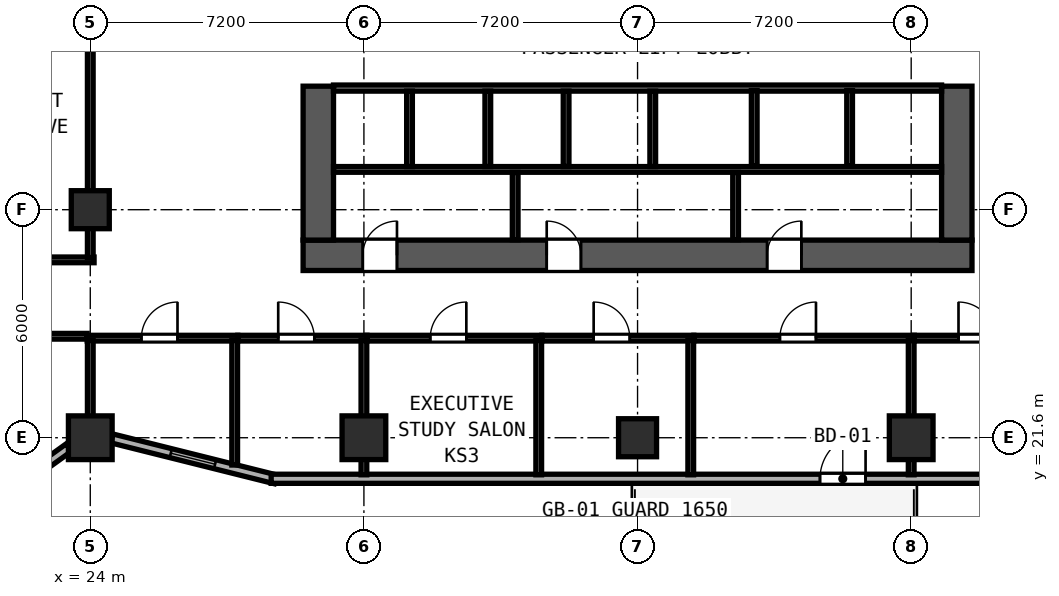
"""IFC4 building model, lengths in metres.
Left out: names, types, materials, properties, quantities, classifications, styles, units other than length and angle.
Written with IfcOpenShell. Run it as: python <this file> out.ifc"""

import sys

from ifc_helpers import new_model, si_unit, direction, frame, frame_2d, origin, origin_2d, place, context, subcontext, project, spatial, rectangle, hollow_rectangle, extrude, element, fill, save


model = new_model("IFC4")
c1 = context("Model", 3, precision=1e-05, world=origin(), true_north=direction((0.0, 1.0)))
c2 = subcontext(c1, "Body", "Model", "MODEL_VIEW")
j1 = project(units=[si_unit("LENGTHUNIT", "METRE"), si_unit("PLANEANGLEUNIT", "RADIAN")], contexts=[c1])
p1 = place(None, origin())
s1 = spatial("IfcSite", under=j1, at=p1, CompositionType="ELEMENT")
p2 = place(p1, origin())
s2 = spatial("IfcBuilding", under=s1, at=p2, CompositionType="ELEMENT")
p3 = place(p2, frame((0.0, 0.0, 47.6)))
s3 = spatial("IfcBuildingStorey", under=s2, at=p3, CompositionType="ELEMENT", Elevation=47.6)
p4 = place(p3, frame((29.6, 26.4, 0.0), z_axis=(0.0, 0.0, 1.0), x_axis=(1.0, 0.0, 0.0)))
e1 = element("IfcWall", 1, at=p4, inside=s3, PredefinedType="SHEAR", context=c2, shape_type="SweptSolid", body=[
    extrude(rectangle(XDim=17.6, YDim=0.8, at=frame_2d((8.8, 0.0))), origin(), (0.0, 0.0, 1.0), 3.6),
])
p5 = place(p4, frame((2.47, 0.0, 0.0), z_axis=(0.0, 0.0, 1.0), x_axis=(-1.0, 0.0, 0.0)))
e2 = element("IfcOpeningElement", 2, at=p5, cuts=e1, PredefinedType="OPENING", context=c2, shape_type="SweptSolid", body=[
    extrude(rectangle(XDim=0.9, YDim=2.1, at=frame_2d((0.45, 1.05))), frame((0.0, 0.41, 0.0), z_axis=(0.0, -1.0, 0.0), x_axis=(1.0, 0.0, 0.0)), (0.0, 0.0, 1.0), 0.82),
])
p6 = place(p4, frame((7.31, 0.0, 0.0), z_axis=(0.0, 0.0, 1.0), x_axis=(-1.0, 0.0, 0.0)))
e3 = element("IfcOpeningElement", 3, at=p6, cuts=e1, PredefinedType="OPENING", context=c2, shape_type="SweptSolid", body=[
    extrude(rectangle(XDim=0.9, YDim=2.1, at=frame_2d((0.45, 1.05))), frame((0.0, 0.41, 0.0), z_axis=(0.0, -1.0, 0.0), x_axis=(1.0, 0.0, 0.0)), (0.0, 0.0, 1.0), 0.82),
])
p7 = place(p4, frame((13.11, 0.0, 0.0), z_axis=(0.0, 0.0, 1.0), x_axis=(-1.0, 0.0, 0.0)))
e4 = element("IfcOpeningElement", 4, at=p7, cuts=e1, PredefinedType="OPENING", context=c2, shape_type="SweptSolid", body=[
    extrude(rectangle(XDim=0.9, YDim=2.1, at=frame_2d((0.45, 1.05))), frame((0.0, 0.41, 0.0), z_axis=(0.0, -1.0, 0.0), x_axis=(1.0, 0.0, 0.0)), (0.0, 0.0, 1.0), 0.82),
])
for number, where, z_axis, x_axis in (
    (5, (30.0, 26.8, 0.0), (0.0, 0.0, 1.0), (0.0, 1.0, 0.0)),
    (6, (46.8, 26.8, 0.0), (0.0, 0.0, 1.0), (0.0, 1.0, 0.0)),
):
    element("IfcWall", number, at=place(p3, frame(where, z_axis=z_axis, x_axis=x_axis)), inside=s3, PredefinedType="SHEAR", context=c2, shape_type="SweptSolid", body=[
        extrude(rectangle(XDim=4.05, YDim=0.8, at=frame_2d((2.025, 0.0))), origin(), (0.0, 0.0, 1.0), 3.6),
    ])
for number, where, z_axis, x_axis in (
    (7, (24.0, 21.6, 0.0), (0.0, 0.0, 1.0), (1.0, 0.0, 0.0)),
    (8, (31.2, 21.6, 0.0), (0.0, 0.0, 1.0), (1.0, 0.0, 0.0)),
    (9, (45.6, 21.6, 0.0), (0.0, 0.0, 1.0), (1.0, 0.0, 0.0)),
):
    element("IfcColumn", number, at=place(p3, frame(where, z_axis=z_axis, x_axis=x_axis)), inside=s3, PredefinedType="COLUMN", context=c2, shape_type="SweptSolid", body=[
        extrude(hollow_rectangle(XDim=1.15, YDim=1.15, WallThickness=0.042, at=origin_2d()), origin(), (0.0, 0.0, 1.0), 3.8),
    ])
for number, where, z_axis, x_axis in (
    (10, (24.0, 27.6, 0.0), (0.0, 0.0, 1.0), (1.0, 0.0, 0.0)),
    (11, (38.4, 21.6, 0.0), (0.0, 0.0, 1.0), (1.0, 0.0, 0.0)),
):
    element("IfcColumn", number, at=place(p3, frame(where, z_axis=z_axis, x_axis=x_axis)), inside=s3, PredefinedType="COLUMN", context=c2, shape_type="SweptSolid", body=[
        extrude(hollow_rectangle(XDim=1.0, YDim=1.0, WallThickness=0.038, at=origin_2d()), origin(), (0.0, 0.0, 1.0), 3.8),
    ])
p8 = place(p3, frame((14.075, 14.602, 0.0), z_axis=(0.0, 0.0, 1.0), x_axis=(0.811543176492, 0.58429245476, 0.0)))
e12 = element("IfcWall", 12, at=p8, inside=s3, PredefinedType="SOLIDWALL", context=c2, shape_type="SweptSolid", body=[
    extrude(rectangle(XDim=11.531, YDim=0.24, at=frame_2d((5.765, 0.0))), origin(), (0.0, 0.0, 1.0), 3.097),
])
p9 = place(p8, frame((0.95, 0.0, 0.85)))
e13 = element("IfcOpeningElement", 13, at=p9, cuts=e12, PredefinedType="OPENING", context=c2, shape_type="SweptSolid", body=[
    extrude(rectangle(XDim=1.2, YDim=1.85, at=frame_2d((0.6, 0.925))), frame((0.0, 0.13, 0.0), z_axis=(0.0, -1.0, 0.0), x_axis=(1.0, 0.0, 0.0)), (0.0, 0.0, 1.0), 0.26),
])
p10 = place(p8, frame((7.574, 0.0, 0.85)))
e14 = element("IfcOpeningElement", 14, at=p10, cuts=e12, PredefinedType="OPENING", context=c2, shape_type="SweptSolid", body=[
    extrude(rectangle(XDim=1.2, YDim=1.85, at=frame_2d((0.6, 0.925))), frame((0.0, 0.13, 0.0), z_axis=(0.0, -1.0, 0.0), x_axis=(1.0, 0.0, 0.0)), (0.0, 0.0, 1.0), 0.26),
])
p11 = place(p8, frame((4.262, 0.0, 0.85)))
e15 = element("IfcOpeningElement", 15, at=p11, cuts=e12, PredefinedType="OPENING", context=c2, shape_type="SweptSolid", body=[
    extrude(rectangle(XDim=1.2, YDim=1.85, at=frame_2d((0.6, 0.925))), frame((0.0, 0.13, 0.0), z_axis=(0.0, -1.0, 0.0), x_axis=(1.0, 0.0, 0.0)), (0.0, 0.0, 1.0), 0.26),
])
p12 = place(p3, frame((24.567, 21.582, 0.0), z_axis=(0.0, 0.0, 1.0), x_axis=(0.970148978127, -0.24250971164, 0.0)))
e16 = element("IfcWall", 16, at=p12, inside=s3, PredefinedType="SOLIDWALL", context=c2, shape_type="SweptSolid", body=[
    extrude(rectangle(XDim=4.434, YDim=0.24, at=frame_2d((2.217, 0.0))), origin(), (0.0, 0.0, 1.0), 3.097),
])
p13 = place(p12, frame((1.6, 0.0, 0.85)))
e17 = element("IfcOpeningElement", 17, at=p13, cuts=e16, PredefinedType="OPENING", context=c2, shape_type="SweptSolid", body=[
    extrude(rectangle(XDim=1.2, YDim=1.85, at=frame_2d((0.6, 0.925))), frame((0.0, 0.13, 0.0), z_axis=(0.0, -1.0, 0.0), x_axis=(1.0, 0.0, 0.0)), (0.0, 0.0, 1.0), 0.26),
])
p14 = place(p3, frame((28.76, 20.52, 0.0), z_axis=(0.0, 0.0, 1.0), x_axis=(1.0, 0.0, 0.0)))
e18 = element("IfcWall", 18, at=p14, inside=s3, PredefinedType="SOLIDWALL", context=c2, shape_type="SweptSolid", body=[
    extrude(rectangle(XDim=19.281, YDim=0.24, at=frame_2d((9.64, 0.0))), origin(), (0.0, 0.0, 1.0), 3.6),
])
p15 = place(p14, frame((15.64, 0.0, 0.0), z_axis=(0.0, 0.0, 1.0), x_axis=(-1.0, 0.0, 0.0)))
e19 = element("IfcOpeningElement", 19, at=p15, cuts=e18, PredefinedType="OPENING", context=c2, shape_type="SweptSolid", body=[
    extrude(rectangle(XDim=1.2, YDim=2.15, at=frame_2d((0.6, 1.075))), frame((0.0, 0.13, 0.0), z_axis=(0.0, -1.0, 0.0), x_axis=(1.0, 0.0, 0.0)), (0.0, 0.0, 1.0), 0.26),
])
p16 = place(p3, frame((30.4, 30.8, 0.0), z_axis=(0.0, 0.0, 1.0), x_axis=(1.0, 0.0, 0.0)))
e20 = element("IfcWall", 20, at=p16, inside=s3, PredefinedType="SOLIDWALL", context=c2, shape_type="SweptSolid", body=[
    extrude(rectangle(XDim=16.0, YDim=0.16, at=frame_2d((8.0, 0.0))), origin(), (0.0, 0.0, 1.0), 3.6),
])
p17 = place(p3, frame((30.4, 28.66, 0.0), z_axis=(0.0, 0.0, 1.0), x_axis=(1.0, 0.0, 0.0)))
e21 = element("IfcWall", 21, at=p17, inside=s3, PredefinedType="PARTITIONING", context=c2, shape_type="SweptSolid", body=[
    extrude(rectangle(XDim=16.0, YDim=0.15, at=frame_2d((8.0, 0.0))), origin(), (0.0, 0.0, 1.0), 3.6),
])
for number, where, z_axis, x_axis in (
    (22, (32.4, 28.735, 0.0), (0.0, 0.0, 1.0), (0.0, 1.0, 0.0)),
    (23, (34.46, 28.735, 0.0), (0.0, 0.0, 1.0), (0.0, 1.0, 0.0)),
    (24, (36.52, 28.735, 0.0), (0.0, 0.0, 1.0), (0.0, 1.0, 0.0)),
    (25, (38.8, 28.735, 0.0), (0.0, 0.0, 1.0), (0.0, 1.0, 0.0)),
):
    element("IfcWall", number, at=place(p3, frame(where, z_axis=z_axis, x_axis=x_axis)), inside=s3, PredefinedType="SOLIDWALL", context=c2, shape_type="SweptSolid", body=[
        extrude(rectangle(XDim=1.985, YDim=0.15, at=frame_2d((0.992, 0.0))), origin(), (0.0, 0.0, 1.0), 3.6),
    ])
for number, where, z_axis, x_axis in (
    (26, (35.18, 26.81, 0.0), (0.0, 0.0, 1.0), (0.0, 1.0, 0.0)),
    (27, (40.98, 26.81, 0.0), (0.0, 0.0, 1.0), (0.0, 1.0, 0.0)),
):
    element("IfcWall", number, at=place(p3, frame(where, z_axis=z_axis, x_axis=x_axis)), inside=s3, PredefinedType="PARTITIONING", context=c2, shape_type="SweptSolid", body=[
        extrude(rectangle(XDim=1.77, YDim=0.15, at=frame_2d((0.885, 0.0))), origin(), (0.0, 0.0, 1.0), 3.6),
    ])
for number, where, z_axis, x_axis in (
    (28, (41.47, 28.75, 0.0), (0.0, 0.0, 1.0), (0.0, 1.0, 0.0)),
    (29, (43.98, 28.75, 0.0), (0.0, 0.0, 1.0), (0.0, 1.0, 0.0)),
):
    element("IfcWall", number, at=place(p3, frame(where, z_axis=z_axis, x_axis=x_axis)), inside=s3, PredefinedType="SOLIDWALL", context=c2, shape_type="SweptSolid", body=[
        extrude(rectangle(XDim=1.985, YDim=0.15, at=frame_2d((0.993, 0.0))), origin(), (0.0, 0.0, 1.0), 3.6),
    ])
p18 = place(p3, frame((23.92, 24.22, 0.0), z_axis=(0.0, 0.0, 1.0), x_axis=(1.0, 0.0, 0.0)))
e30 = element("IfcWall", 30, at=p18, inside=s3, PredefinedType="PARTITIONING", context=c2, shape_type="SweptSolid", body=[
    extrude(rectangle(XDim=3.96, YDim=0.15, at=frame_2d((1.98, 0.0))), origin(), (0.0, 0.0, 1.0), 3.6),
])
p19 = place(p18, frame((2.375, 0.0, 0.0), z_axis=(0.0, 0.0, 1.0), x_axis=(-1.0, 0.0, 0.0)))
e31 = element("IfcOpeningElement", 31, at=p19, cuts=e30, PredefinedType="OPENING", context=c2, shape_type="SweptSolid", body=[
    extrude(rectangle(XDim=0.95, YDim=2.12, at=frame_2d((0.475, 1.06))), frame((0.0, 0.085, 0.0), z_axis=(0.0, -1.0, 0.0), x_axis=(1.0, 0.0, 0.0)), (0.0, 0.0, 1.0), 0.17),
])
p20 = place(p3, frame((24.0, 21.819, 0.0), z_axis=(0.0, 0.0, 1.0), x_axis=(0.0, 1.0, 0.0)))
e32 = element("IfcWall", 32, at=p20, inside=s3, PredefinedType="PARTITIONING", context=c2, shape_type="SweptSolid", body=[
    extrude(rectangle(XDim=2.341, YDim=0.15, at=frame_2d((1.171, 0.0))), origin(), (0.0, 0.0, 1.0), 3.097),
])
p21 = place(p3, frame((27.8, 20.882, 0.0), z_axis=(0.0, 0.0, 1.0), x_axis=(0.0, 1.0, 0.0)))
e33 = element("IfcWall", 33, at=p21, inside=s3, PredefinedType="PARTITIONING", context=c2, shape_type="SweptSolid", body=[
    extrude(rectangle(XDim=3.278, YDim=0.15, at=frame_2d((1.639, 0.0))), origin(), (0.0, 0.0, 1.0), 3.6),
])
p22 = place(p3, frame((27.882, 24.22, 0.0), z_axis=(0.0, 0.0, 1.0), x_axis=(1.0, 0.0, 0.0)))
e34 = element("IfcWall", 34, at=p22, inside=s3, PredefinedType="PARTITIONING", context=c2, shape_type="SweptSolid", body=[
    extrude(rectangle(XDim=3.398, YDim=0.15, at=frame_2d((1.699, 0.0))), origin(), (0.0, 0.0, 1.0), 3.6),
])
p23 = place(p22, frame((2.013, 0.0, 0.0), z_axis=(0.0, 0.0, 1.0), x_axis=(-1.0, 0.0, 0.0)))
e35 = element("IfcOpeningElement", 35, at=p23, cuts=e34, PredefinedType="OPENING", context=c2, shape_type="SweptSolid", body=[
    extrude(rectangle(XDim=0.95, YDim=2.12, at=frame_2d((0.475, 1.06))), frame((0.0, 0.085, 0.0), z_axis=(0.0, -1.0, 0.0), x_axis=(1.0, 0.0, 0.0)), (0.0, 0.0, 1.0), 0.17),
])
p24 = place(p3, frame((31.2, 20.625, 0.0), z_axis=(0.0, 0.0, 1.0), x_axis=(0.0, 1.0, 0.0)))
e36 = element("IfcWall", 36, at=p24, inside=s3, PredefinedType="PARTITIONING", context=c2, shape_type="SweptSolid", body=[
    extrude(rectangle(XDim=3.535, YDim=0.15, at=frame_2d((1.768, 0.0))), origin(), (0.0, 0.0, 1.0), 2.985),
])
p25 = place(p3, frame((31.282, 24.22, 0.0), z_axis=(0.0, 0.0, 1.0), x_axis=(1.0, 0.0, 0.0)))
e37 = element("IfcWall", 37, at=p25, inside=s3, PredefinedType="PARTITIONING", context=c2, shape_type="SweptSolid", body=[
    extrude(rectangle(XDim=4.598, YDim=0.15, at=frame_2d((2.299, 0.0))), origin(), (0.0, 0.0, 1.0), 3.6),
])
p26 = place(p25, frame((2.613, 0.0, 0.0), z_axis=(0.0, 0.0, 1.0), x_axis=(-1.0, 0.0, 0.0)))
e38 = element("IfcOpeningElement", 38, at=p26, cuts=e37, PredefinedType="OPENING", context=c2, shape_type="SweptSolid", body=[
    extrude(rectangle(XDim=0.95, YDim=2.12, at=frame_2d((0.475, 1.06))), frame((0.0, 0.085, 0.0), z_axis=(0.0, -1.0, 0.0), x_axis=(1.0, 0.0, 0.0)), (0.0, 0.0, 1.0), 0.17),
])
p27 = place(p3, frame((35.8, 20.625, 0.0), z_axis=(0.0, 0.0, 1.0), x_axis=(0.0, 1.0, 0.0)))
e39 = element("IfcWall", 39, at=p27, inside=s3, PredefinedType="PARTITIONING", context=c2, shape_type="SweptSolid", body=[
    extrude(rectangle(XDim=3.535, YDim=0.15, at=frame_2d((1.768, 0.0))), origin(), (0.0, 0.0, 1.0), 3.6),
])
p28 = place(p3, frame((35.882, 24.22, 0.0), z_axis=(0.0, 0.0, 1.0), x_axis=(1.0, 0.0, 0.0)))
e40 = element("IfcWall", 40, at=p28, inside=s3, PredefinedType="PARTITIONING", context=c2, shape_type="SweptSolid", body=[
    extrude(rectangle(XDim=3.998, YDim=0.15, at=frame_2d((1.999, 0.0))), origin(), (0.0, 0.0, 1.0), 3.6),
])
p29 = place(p28, frame((2.313, 0.0, 0.0), z_axis=(0.0, 0.0, 1.0), x_axis=(-1.0, 0.0, 0.0)))
e41 = element("IfcOpeningElement", 41, at=p29, cuts=e40, PredefinedType="OPENING", context=c2, shape_type="SweptSolid", body=[
    extrude(rectangle(XDim=0.95, YDim=2.12, at=frame_2d((0.475, 1.06))), frame((0.0, 0.085, 0.0), z_axis=(0.0, -1.0, 0.0), x_axis=(1.0, 0.0, 0.0)), (0.0, 0.0, 1.0), 0.17),
])
p30 = place(p3, frame((39.8, 20.625, 0.0), z_axis=(0.0, 0.0, 1.0), x_axis=(0.0, 1.0, 0.0)))
e42 = element("IfcWall", 42, at=p30, inside=s3, PredefinedType="PARTITIONING", context=c2, shape_type="SweptSolid", body=[
    extrude(rectangle(XDim=3.535, YDim=0.15, at=frame_2d((1.768, 0.0))), origin(), (0.0, 0.0, 1.0), 3.6),
])
p31 = place(p3, frame((39.882, 24.22, 0.0), z_axis=(0.0, 0.0, 1.0), x_axis=(1.0, 0.0, 0.0)))
e43 = element("IfcWall", 43, at=p31, inside=s3, PredefinedType="PARTITIONING", context=c2, shape_type="SweptSolid", body=[
    extrude(rectangle(XDim=5.798, YDim=0.15, at=frame_2d((2.899, 0.0))), origin(), (0.0, 0.0, 1.0), 3.6),
])
p32 = place(p31, frame((3.213, 0.0, 0.0), z_axis=(0.0, 0.0, 1.0), x_axis=(-1.0, 0.0, 0.0)))
e44 = element("IfcOpeningElement", 44, at=p32, cuts=e43, PredefinedType="OPENING", context=c2, shape_type="SweptSolid", body=[
    extrude(rectangle(XDim=0.95, YDim=2.12, at=frame_2d((0.475, 1.06))), frame((0.0, 0.085, 0.0), z_axis=(0.0, -1.0, 0.0), x_axis=(1.0, 0.0, 0.0)), (0.0, 0.0, 1.0), 0.17),
])
p33 = place(p3, frame((45.6, 20.625, 0.0), z_axis=(0.0, 0.0, 1.0), x_axis=(0.0, 1.0, 0.0)))
e45 = element("IfcWall", 45, at=p33, inside=s3, PredefinedType="PARTITIONING", context=c2, shape_type="SweptSolid", body=[
    extrude(rectangle(XDim=3.535, YDim=0.15, at=frame_2d((1.768, 0.0))), origin(), (0.0, 0.0, 1.0), 2.985),
])
p34 = place(p3, frame((45.682, 24.22, 0.0), z_axis=(0.0, 0.0, 1.0), x_axis=(1.0, 0.0, 0.0)))
e46 = element("IfcWall", 46, at=p34, inside=s3, PredefinedType="PARTITIONING", context=c2, shape_type="SweptSolid", body=[
    extrude(rectangle(XDim=3.598, YDim=0.15, at=frame_2d((1.799, 0.0))), origin(), (0.0, 0.0, 1.0), 3.6),
])
p35 = place(p34, frame((2.113, 0.0, 0.0), z_axis=(0.0, 0.0, 1.0), x_axis=(-1.0, 0.0, 0.0)))
e47 = element("IfcOpeningElement", 47, at=p35, cuts=e46, PredefinedType="OPENING", context=c2, shape_type="SweptSolid", body=[
    extrude(rectangle(XDim=0.95, YDim=2.12, at=frame_2d((0.475, 1.06))), frame((0.0, 0.085, 0.0), z_axis=(0.0, -1.0, 0.0), x_axis=(1.0, 0.0, 0.0)), (0.0, 0.0, 1.0), 0.17),
])
p36 = place(p3, frame((20.072, 26.28, 0.0), z_axis=(0.0, 0.0, 1.0), x_axis=(1.0, 0.0, 0.0)))
e48 = element("IfcWall", 48, at=p36, inside=s3, PredefinedType="PARTITIONING", context=c2, shape_type="SweptSolid", body=[
    extrude(rectangle(XDim=4.028, YDim=0.15, at=frame_2d((2.014, 0.0))), origin(), (0.0, 0.0, 1.0), 3.6),
])
p37 = place(p36, frame((0.14, 0.0, 0.0)))
e49 = element("IfcOpeningElement", 49, at=p37, cuts=e48, PredefinedType="OPENING", context=c2, shape_type="SweptSolid", body=[
    extrude(rectangle(XDim=0.95, YDim=2.18, at=frame_2d((0.475, 1.09))), frame((0.0, 0.085, 0.0), z_axis=(0.0, -1.0, 0.0), x_axis=(1.0, 0.0, 0.0)), (0.0, 0.0, 1.0), 0.17),
])
p38 = place(p3, frame((24.0, 26.34, 0.0), z_axis=(0.0, 0.0, 1.0), x_axis=(0.0, 1.0, 0.0)))
e50 = element("IfcWall", 50, at=p38, inside=s3, PredefinedType="PARTITIONING", context=c2, shape_type="SweptSolid", body=[
    extrude(rectangle(XDim=6.6, YDim=0.15, at=frame_2d((3.3, 0.0))), origin(), (0.0, 0.0, 1.0), 3.097),
])
p39 = place(p3, frame((20.072, 24.27, 0.0), z_axis=(0.0, 0.0, 1.0), x_axis=(1.0, 0.0, 0.0)))
e51 = element("IfcWall", 51, at=p39, inside=s3, PredefinedType="PARTITIONING", context=c2, shape_type="SweptSolid", body=[
    extrude(rectangle(XDim=3.846, YDim=0.15, at=frame_2d((1.923, 0.0))), origin(), (0.0, 0.0, 1.0), 3.6),
])
p40 = place(p39, frame((2.308, 0.0, 0.0), z_axis=(0.0, 0.0, 1.0), x_axis=(-1.0, 0.0, 0.0)))
e52 = element("IfcOpeningElement", 52, at=p40, cuts=e51, PredefinedType="OPENING", context=c2, shape_type="SweptSolid", body=[
    extrude(rectangle(XDim=0.95, YDim=2.12, at=frame_2d((0.475, 1.06))), frame((0.0, 0.085, 0.0), z_axis=(0.0, -1.0, 0.0), x_axis=(1.0, 0.0, 0.0)), (0.0, 0.0, 1.0), 0.17),
])
p41 = place(p13, origin())
e53 = element("IfcWindow", 53, at=p41, inside=s3, PartitioningType="SINGLE_PANEL", PredefinedType="WINDOW", context=c2, shape_type="SweptSolid", body=[
    extrude(rectangle(XDim=1.2, YDim=1.85, at=frame_2d((0.6, 0.925))), frame((0.0, 0.03, 0.0), z_axis=(0.0, -1.0, 0.0), x_axis=(1.0, 0.0, 0.0)), (0.0, 0.0, 1.0), 0.06),
])
fill(e17, e53)
p42 = place(p15, origin())
e54 = element("IfcDoor", 54, at=p42, inside=s3, OperationType="SINGLE_SWING_LEFT", PredefinedType="DOOR", context=c2, shape_type="SweptSolid", body=[
    extrude(rectangle(XDim=1.2, YDim=2.15, at=frame_2d((0.6, 1.075))), frame((0.0, 0.025, 0.0), z_axis=(0.0, -1.0, 0.0), x_axis=(1.0, 0.0, 0.0)), (0.0, 0.0, 1.0), 0.05),
])
fill(e19, e54)
p43 = place(p5, origin())
e55 = element("IfcDoor", 55, at=p43, inside=s3, OperationType="SINGLE_SWING_LEFT", PredefinedType="DOOR", context=c2, shape_type="SweptSolid", body=[
    extrude(rectangle(XDim=0.9, YDim=2.1, at=frame_2d((0.45, 1.05))), frame((0.0, -0.195, 0.0), z_axis=(0.0, -1.0, 0.0), x_axis=(1.0, 0.0, 0.0)), (0.0, 0.0, 1.0), 0.05),
])
fill(e2, e55)
p44 = place(p6, origin())
e56 = element("IfcDoor", 56, at=p44, inside=s3, OperationType="SINGLE_SWING_RIGHT", PredefinedType="DOOR", context=c2, shape_type="SweptSolid", body=[
    extrude(rectangle(XDim=0.9, YDim=2.1, at=frame_2d((0.45, 1.05))), frame((0.0, -0.195, 0.0), z_axis=(0.0, -1.0, 0.0), x_axis=(1.0, 0.0, 0.0)), (0.0, 0.0, 1.0), 0.05),
])
fill(e3, e56)
p45 = place(p7, origin())
e57 = element("IfcDoor", 57, at=p45, inside=s3, OperationType="SINGLE_SWING_LEFT", PredefinedType="DOOR", context=c2, shape_type="SweptSolid", body=[
    extrude(rectangle(XDim=0.9, YDim=2.1, at=frame_2d((0.45, 1.05))), frame((0.0, -0.195, 0.0), z_axis=(0.0, -1.0, 0.0), x_axis=(1.0, 0.0, 0.0)), (0.0, 0.0, 1.0), 0.05),
])
fill(e4, e57)
p46 = place(p19, origin())
e58 = element("IfcDoor", 58, at=p46, inside=s3, OperationType="SINGLE_SWING_LEFT", PredefinedType="DOOR", context=c2, shape_type="SweptSolid", body=[
    extrude(rectangle(XDim=0.95, YDim=2.12, at=frame_2d((0.475, 1.06))), frame((0.0, 0.025, 0.0), z_axis=(0.0, -1.0, 0.0), x_axis=(1.0, 0.0, 0.0)), (0.0, 0.0, 1.0), 0.05),
])
fill(e31, e58)
p47 = place(p23, origin())
e59 = element("IfcDoor", 59, at=p47, inside=s3, OperationType="SINGLE_SWING_RIGHT", PredefinedType="DOOR", context=c2, shape_type="SweptSolid", body=[
    extrude(rectangle(XDim=0.95, YDim=2.12, at=frame_2d((0.475, 1.06))), frame((0.0, 0.025, 0.0), z_axis=(0.0, -1.0, 0.0), x_axis=(1.0, 0.0, 0.0)), (0.0, 0.0, 1.0), 0.05),
])
fill(e35, e59)
p48 = place(p26, origin())
e60 = element("IfcDoor", 60, at=p48, inside=s3, OperationType="SINGLE_SWING_LEFT", PredefinedType="DOOR", context=c2, shape_type="SweptSolid", body=[
    extrude(rectangle(XDim=0.95, YDim=2.12, at=frame_2d((0.475, 1.06))), frame((0.0, 0.025, 0.0), z_axis=(0.0, -1.0, 0.0), x_axis=(1.0, 0.0, 0.0)), (0.0, 0.0, 1.0), 0.05),
])
fill(e38, e60)
p49 = place(p29, origin())
e61 = element("IfcDoor", 61, at=p49, inside=s3, OperationType="SINGLE_SWING_RIGHT", PredefinedType="DOOR", context=c2, shape_type="SweptSolid", body=[
    extrude(rectangle(XDim=0.95, YDim=2.12, at=frame_2d((0.475, 1.06))), frame((0.0, 0.025, 0.0), z_axis=(0.0, -1.0, 0.0), x_axis=(1.0, 0.0, 0.0)), (0.0, 0.0, 1.0), 0.05),
])
fill(e41, e61)
p50 = place(p32, origin())
e62 = element("IfcDoor", 62, at=p50, inside=s3, OperationType="SINGLE_SWING_LEFT", PredefinedType="DOOR", context=c2, shape_type="SweptSolid", body=[
    extrude(rectangle(XDim=0.95, YDim=2.12, at=frame_2d((0.475, 1.06))), frame((0.0, 0.025, 0.0), z_axis=(0.0, -1.0, 0.0), x_axis=(1.0, 0.0, 0.0)), (0.0, 0.0, 1.0), 0.05),
])
fill(e44, e62)
p51 = place(p35, origin())
e63 = element("IfcDoor", 63, at=p51, inside=s3, OperationType="SINGLE_SWING_RIGHT", PredefinedType="DOOR", context=c2, shape_type="SweptSolid", body=[
    extrude(rectangle(XDim=0.95, YDim=2.12, at=frame_2d((0.475, 1.06))), frame((0.0, 0.025, 0.0), z_axis=(0.0, -1.0, 0.0), x_axis=(1.0, 0.0, 0.0)), (0.0, 0.0, 1.0), 0.05),
])
fill(e47, e63)
save(model, sys.argv[1])
